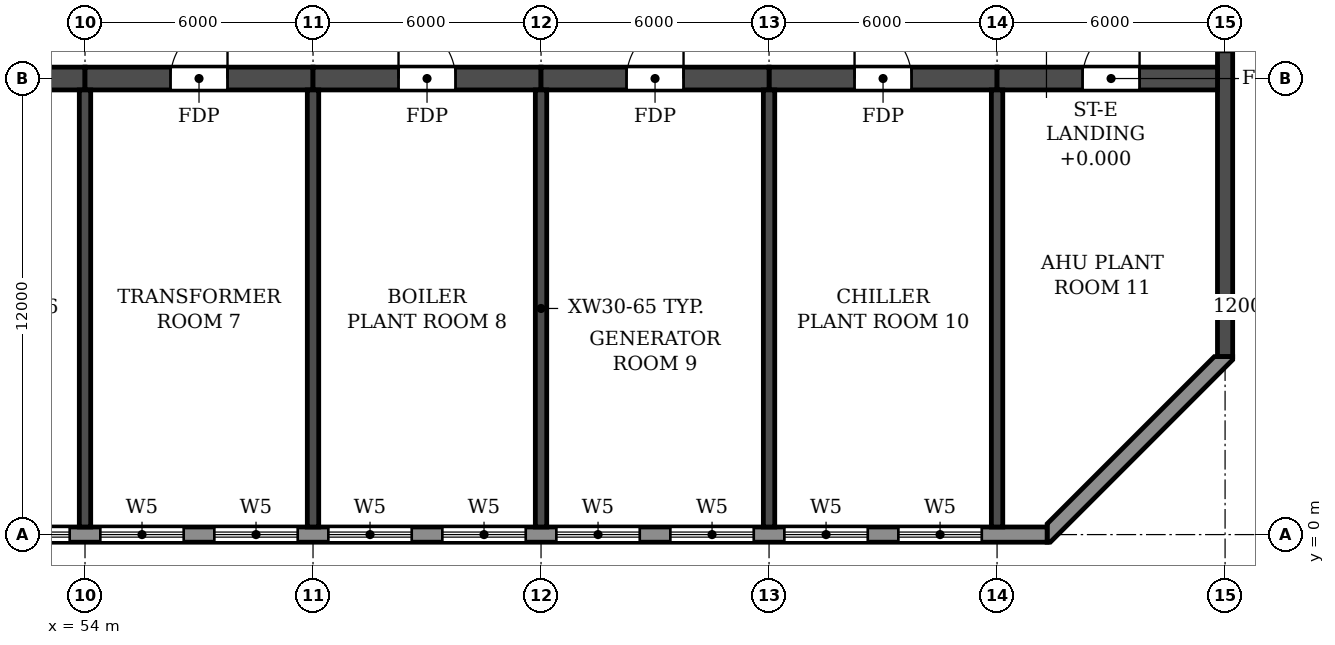
"""IFC4 building model, lengths in metres.
Left out: names, types, materials, properties, quantities, classifications, styles, units other than length and angle.
Written with IfcOpenShell. Run it as: python <this file> out.ifc"""

import sys

from ifc_helpers import new_model, si_unit, direction, frame, frame_2d, origin, place, context, subcontext, project, spatial, polyline, rectangle, outline, extrude, element, fill, save


model = new_model("IFC4")
c1 = context("Model", 3, precision=1e-05, world=origin(), true_north=direction((0.0, 1.0)))
c2 = subcontext(c1, "Body", "Model", "MODEL_VIEW")
j1 = project(units=[si_unit("LENGTHUNIT", "METRE"), si_unit("PLANEANGLEUNIT", "RADIAN")], contexts=[c1])
p1 = place(None, origin())
s1 = spatial("IfcSite", under=j1, at=p1, CompositionType="ELEMENT")
p2 = place(p1, origin())
s2 = spatial("IfcBuilding", under=s1, at=p2, CompositionType="ELEMENT")
p3 = place(p2, frame((0.0, 0.0, 165.3)))
s3 = spatial("IfcBuildingStorey", under=s2, at=p3, CompositionType="ELEMENT", Elevation=165.3)
for number, where, z_axis, x_axis in (
    (1, (54.0, 0.2, 0.0), (0.0, 0.0, 1.0), (0.0, 1.0, 0.0)),
    (2, (60.0, 0.2, 0.0), (0.0, 0.0, 1.0), (0.0, 1.0, 0.0)),
    (3, (66.0, 0.2, 0.0), (0.0, 0.0, 1.0), (0.0, 1.0, 0.0)),
    (4, (72.0, 0.2, 0.0), (0.0, 0.0, 1.0), (0.0, 1.0, 0.0)),
    (5, (78.0, 0.2, 0.0), (0.0, 0.0, 1.0), (0.0, 1.0, 0.0)),
):
    element("IfcWall", number, at=place(p3, frame(where, z_axis=z_axis, x_axis=x_axis)), inside=s3, PredefinedType="SHEAR", context=c2, shape_type="SweptSolid", body=[
        extrude(rectangle(XDim=11.5, YDim=0.3, at=frame_2d((5.75, 0.0))), origin(), (0.0, 0.0, 1.0), 6.38),
    ])
p4 = place(p3, frame((84.0, 4.683, 0.0), z_axis=(0.0, 0.0, 1.0), x_axis=(0.0, 1.0, 0.0)))
e6 = element("IfcWall", 6, at=p4, inside=s3, PredefinedType="SHEAR", context=c2, shape_type="SweptSolid", body=[
    extrude(rectangle(XDim=33.034, YDim=0.4, at=frame_2d((16.517, 0.0))), origin(), (0.0, 0.0, 1.0), 6.38),
])
p5 = place(p4, frame((23.817, 0.0, 0.9)))
e7 = element("IfcOpeningElement", 7, at=p5, cuts=e6, PredefinedType="OPENING", context=c2, shape_type="SweptSolid", body=[
    extrude(rectangle(XDim=1.2, YDim=1.5, at=frame_2d((0.6, 0.75))), frame((0.0, 0.21, 0.0), z_axis=(0.0, -1.0, 0.0), x_axis=(1.0, 0.0, 0.0)), (0.0, 0.0, 1.0), 0.42),
])
p6 = place(p4, frame((8.017, 0.0, 0.9)))
e8 = element("IfcOpeningElement", 8, at=p6, cuts=e6, PredefinedType="OPENING", context=c2, shape_type="SweptSolid", body=[
    extrude(rectangle(XDim=1.2, YDim=1.5, at=frame_2d((0.6, 0.75))), frame((0.0, 0.21, 0.0), z_axis=(0.0, -1.0, 0.0), x_axis=(1.0, 0.0, 0.0)), (0.0, 0.0, 1.0), 0.42),
])
p7 = place(p4, frame((15.917, 0.0, 0.9)))
e9 = element("IfcOpeningElement", 9, at=p7, cuts=e6, PredefinedType="OPENING", context=c2, shape_type="SweptSolid", body=[
    extrude(rectangle(XDim=1.2, YDim=1.5, at=frame_2d((0.6, 0.75))), frame((0.0, 0.21, 0.0), z_axis=(0.0, -1.0, 0.0), x_axis=(1.0, 0.0, 0.0)), (0.0, 0.0, 1.0), 0.42),
])
p8 = place(p3, frame((48.0, 12.0, 0.0), z_axis=(0.0, 0.0, 1.0), x_axis=(1.0, 0.0, 0.0)))
e10 = element("IfcWall", 10, at=p8, inside=s3, PredefinedType="SHEAR", context=c2, shape_type="SweptSolid", body=[
    extrude(rectangle(XDim=6.0, YDim=0.6, at=frame_2d((3.0, 0.0))), origin(), (0.0, 0.0, 1.0), 6.38),
])
p9 = place(p8, frame((2.25, 0.0, 0.0)))
e11 = element("IfcOpeningElement", 11, at=p9, cuts=e10, PredefinedType="OPENING", context=c2, shape_type="SweptSolid", body=[
    extrude(rectangle(XDim=1.5, YDim=2.1, at=frame_2d((0.75, 1.05))), frame((0.0, 0.31, 0.0), z_axis=(0.0, -1.0, 0.0), x_axis=(1.0, 0.0, 0.0)), (0.0, 0.0, 1.0), 0.62),
])
p10 = place(p3, frame((54.0, 12.0, 0.0), z_axis=(0.0, 0.0, 1.0), x_axis=(1.0, 0.0, 0.0)))
e12 = element("IfcWall", 12, at=p10, inside=s3, PredefinedType="SHEAR", context=c2, shape_type="SweptSolid", body=[
    extrude(rectangle(XDim=6.0, YDim=0.6, at=frame_2d((3.0, 0.0))), origin(), (0.0, 0.0, 1.0), 6.38),
])
p11 = place(p10, frame((2.25, 0.0, 0.0)))
e13 = element("IfcOpeningElement", 13, at=p11, cuts=e12, PredefinedType="OPENING", context=c2, shape_type="SweptSolid", body=[
    extrude(rectangle(XDim=1.5, YDim=2.1, at=frame_2d((0.75, 1.05))), frame((0.0, 0.31, 0.0), z_axis=(0.0, -1.0, 0.0), x_axis=(1.0, 0.0, 0.0)), (0.0, 0.0, 1.0), 0.62),
])
p12 = place(p3, frame((60.0, 12.0, 0.0), z_axis=(0.0, 0.0, 1.0), x_axis=(1.0, 0.0, 0.0)))
e14 = element("IfcWall", 14, at=p12, inside=s3, PredefinedType="SHEAR", context=c2, shape_type="SweptSolid", body=[
    extrude(rectangle(XDim=6.0, YDim=0.6, at=frame_2d((3.0, 0.0))), origin(), (0.0, 0.0, 1.0), 6.38),
])
p13 = place(p12, frame((2.25, 0.0, 0.0)))
e15 = element("IfcOpeningElement", 15, at=p13, cuts=e14, PredefinedType="OPENING", context=c2, shape_type="SweptSolid", body=[
    extrude(rectangle(XDim=1.5, YDim=2.1, at=frame_2d((0.75, 1.05))), frame((0.0, 0.31, 0.0), z_axis=(0.0, -1.0, 0.0), x_axis=(1.0, 0.0, 0.0)), (0.0, 0.0, 1.0), 0.62),
])
p14 = place(p3, frame((66.0, 12.0, 0.0), z_axis=(0.0, 0.0, 1.0), x_axis=(1.0, 0.0, 0.0)))
e16 = element("IfcWall", 16, at=p14, inside=s3, PredefinedType="SHEAR", context=c2, shape_type="SweptSolid", body=[
    extrude(rectangle(XDim=6.0, YDim=0.6, at=frame_2d((3.0, 0.0))), origin(), (0.0, 0.0, 1.0), 6.38),
])
p15 = place(p14, frame((2.25, 0.0, 0.0)))
e17 = element("IfcOpeningElement", 17, at=p15, cuts=e16, PredefinedType="OPENING", context=c2, shape_type="SweptSolid", body=[
    extrude(rectangle(XDim=1.5, YDim=2.1, at=frame_2d((0.75, 1.05))), frame((0.0, 0.31, 0.0), z_axis=(0.0, -1.0, 0.0), x_axis=(1.0, 0.0, 0.0)), (0.0, 0.0, 1.0), 0.62),
])
p16 = place(p3, frame((72.0, 12.0, 0.0), z_axis=(0.0, 0.0, 1.0), x_axis=(1.0, 0.0, 0.0)))
e18 = element("IfcWall", 18, at=p16, inside=s3, PredefinedType="SHEAR", context=c2, shape_type="SweptSolid", body=[
    extrude(rectangle(XDim=6.0, YDim=0.6, at=frame_2d((3.0, 0.0))), origin(), (0.0, 0.0, 1.0), 6.38),
])
p17 = place(p16, frame((2.25, 0.0, 0.0)))
e19 = element("IfcOpeningElement", 19, at=p17, cuts=e18, PredefinedType="OPENING", context=c2, shape_type="SweptSolid", body=[
    extrude(rectangle(XDim=1.5, YDim=2.1, at=frame_2d((0.75, 1.05))), frame((0.0, 0.31, 0.0), z_axis=(0.0, -1.0, 0.0), x_axis=(1.0, 0.0, 0.0)), (0.0, 0.0, 1.0), 0.62),
])
p18 = place(p3, frame((78.0, 12.0, 0.0), z_axis=(0.0, 0.0, 1.0), x_axis=(1.0, 0.0, 0.0)))
e20 = element("IfcWall", 20, at=p18, inside=s3, PredefinedType="SHEAR", context=c2, shape_type="SweptSolid", body=[
    extrude(rectangle(XDim=5.8, YDim=0.6, at=frame_2d((2.9, 0.0))), origin(), (0.0, 0.0, 1.0), 6.38),
])
p19 = place(p18, frame((2.25, 0.0, 0.0)))
e21 = element("IfcOpeningElement", 21, at=p19, cuts=e20, PredefinedType="OPENING", context=c2, shape_type="SweptSolid", body=[
    extrude(rectangle(XDim=1.5, YDim=2.1, at=frame_2d((0.75, 1.05))), frame((0.0, 0.31, 0.0), z_axis=(0.0, -1.0, 0.0), x_axis=(1.0, 0.0, 0.0)), (0.0, 0.0, 1.0), 0.62),
])
p20 = place(p3, frame((22.683, 0.0, 0.0), z_axis=(0.0, 0.0, 1.0), x_axis=(1.0, 0.0, 0.0)))
e22 = element("IfcWall", 22, at=p20, inside=s3, PredefinedType="STANDARD", context=c2, shape_type="SweptSolid", body=[
    extrude(rectangle(XDim=56.634, YDim=0.4, at=frame_2d((28.317, 0.0))), origin(), (0.0, 0.0, 1.0), 6.38),
])
p21 = place(p20, frame((1.717, 0.0, 0.6)))
e23 = element("IfcOpeningElement", 23, at=p21, cuts=e22, PredefinedType="OPENING", context=c2, shape_type="SweptSolid", body=[
    extrude(rectangle(XDim=2.2, YDim=2.4, at=frame_2d((1.1, 1.2))), frame((0.0, 0.21, 0.0), z_axis=(0.0, -1.0, 0.0), x_axis=(1.0, 0.0, 0.0)), (0.0, 0.0, 1.0), 0.42),
])
p22 = place(p20, frame((4.717, 0.0, 0.6)))
e24 = element("IfcOpeningElement", 24, at=p22, cuts=e22, PredefinedType="OPENING", context=c2, shape_type="SweptSolid", body=[
    extrude(rectangle(XDim=2.2, YDim=2.4, at=frame_2d((1.1, 1.2))), frame((0.0, 0.21, 0.0), z_axis=(0.0, -1.0, 0.0), x_axis=(1.0, 0.0, 0.0)), (0.0, 0.0, 1.0), 0.42),
])
p23 = place(p20, frame((7.717, 0.0, 0.6)))
e25 = element("IfcOpeningElement", 25, at=p23, cuts=e22, PredefinedType="OPENING", context=c2, shape_type="SweptSolid", body=[
    extrude(rectangle(XDim=2.2, YDim=2.4, at=frame_2d((1.1, 1.2))), frame((0.0, 0.21, 0.0), z_axis=(0.0, -1.0, 0.0), x_axis=(1.0, 0.0, 0.0)), (0.0, 0.0, 1.0), 0.42),
])
p24 = place(p20, frame((10.717, 0.0, 0.6)))
e26 = element("IfcOpeningElement", 26, at=p24, cuts=e22, PredefinedType="OPENING", context=c2, shape_type="SweptSolid", body=[
    extrude(rectangle(XDim=2.2, YDim=2.4, at=frame_2d((1.1, 1.2))), frame((0.0, 0.21, 0.0), z_axis=(0.0, -1.0, 0.0), x_axis=(1.0, 0.0, 0.0)), (0.0, 0.0, 1.0), 0.42),
])
p25 = place(p20, frame((13.717, 0.0, 0.6)))
e27 = element("IfcOpeningElement", 27, at=p25, cuts=e22, PredefinedType="OPENING", context=c2, shape_type="SweptSolid", body=[
    extrude(rectangle(XDim=2.2, YDim=2.4, at=frame_2d((1.1, 1.2))), frame((0.0, 0.21, 0.0), z_axis=(0.0, -1.0, 0.0), x_axis=(1.0, 0.0, 0.0)), (0.0, 0.0, 1.0), 0.42),
])
p26 = place(p20, frame((16.717, 0.0, 0.6)))
e28 = element("IfcOpeningElement", 28, at=p26, cuts=e22, PredefinedType="OPENING", context=c2, shape_type="SweptSolid", body=[
    extrude(rectangle(XDim=2.2, YDim=2.4, at=frame_2d((1.1, 1.2))), frame((0.0, 0.21, 0.0), z_axis=(0.0, -1.0, 0.0), x_axis=(1.0, 0.0, 0.0)), (0.0, 0.0, 1.0), 0.42),
])
p27 = place(p20, frame((19.717, 0.0, 0.6)))
e29 = element("IfcOpeningElement", 29, at=p27, cuts=e22, PredefinedType="OPENING", context=c2, shape_type="SweptSolid", body=[
    extrude(rectangle(XDim=2.2, YDim=2.4, at=frame_2d((1.1, 1.2))), frame((0.0, 0.21, 0.0), z_axis=(0.0, -1.0, 0.0), x_axis=(1.0, 0.0, 0.0)), (0.0, 0.0, 1.0), 0.42),
])
p28 = place(p20, frame((22.717, 0.0, 0.6)))
e30 = element("IfcOpeningElement", 30, at=p28, cuts=e22, PredefinedType="OPENING", context=c2, shape_type="SweptSolid", body=[
    extrude(rectangle(XDim=2.2, YDim=2.4, at=frame_2d((1.1, 1.2))), frame((0.0, 0.21, 0.0), z_axis=(0.0, -1.0, 0.0), x_axis=(1.0, 0.0, 0.0)), (0.0, 0.0, 1.0), 0.42),
])
p29 = place(p20, frame((25.717, 0.0, 0.6)))
e31 = element("IfcOpeningElement", 31, at=p29, cuts=e22, PredefinedType="OPENING", context=c2, shape_type="SweptSolid", body=[
    extrude(rectangle(XDim=2.2, YDim=2.4, at=frame_2d((1.1, 1.2))), frame((0.0, 0.21, 0.0), z_axis=(0.0, -1.0, 0.0), x_axis=(1.0, 0.0, 0.0)), (0.0, 0.0, 1.0), 0.42),
])
p30 = place(p20, frame((28.717, 0.0, 0.6)))
e32 = element("IfcOpeningElement", 32, at=p30, cuts=e22, PredefinedType="OPENING", context=c2, shape_type="SweptSolid", body=[
    extrude(rectangle(XDim=2.2, YDim=2.4, at=frame_2d((1.1, 1.2))), frame((0.0, 0.21, 0.0), z_axis=(0.0, -1.0, 0.0), x_axis=(1.0, 0.0, 0.0)), (0.0, 0.0, 1.0), 0.42),
])
p31 = place(p20, frame((31.717, 0.0, 0.6)))
e33 = element("IfcOpeningElement", 33, at=p31, cuts=e22, PredefinedType="OPENING", context=c2, shape_type="SweptSolid", body=[
    extrude(rectangle(XDim=2.2, YDim=2.4, at=frame_2d((1.1, 1.2))), frame((0.0, 0.21, 0.0), z_axis=(0.0, -1.0, 0.0), x_axis=(1.0, 0.0, 0.0)), (0.0, 0.0, 1.0), 0.42),
])
p32 = place(p20, frame((34.717, 0.0, 0.6)))
e34 = element("IfcOpeningElement", 34, at=p32, cuts=e22, PredefinedType="OPENING", context=c2, shape_type="SweptSolid", body=[
    extrude(rectangle(XDim=2.2, YDim=2.4, at=frame_2d((1.1, 1.2))), frame((0.0, 0.21, 0.0), z_axis=(0.0, -1.0, 0.0), x_axis=(1.0, 0.0, 0.0)), (0.0, 0.0, 1.0), 0.42),
])
p33 = place(p20, frame((37.717, 0.0, 0.6)))
e35 = element("IfcOpeningElement", 35, at=p33, cuts=e22, PredefinedType="OPENING", context=c2, shape_type="SweptSolid", body=[
    extrude(rectangle(XDim=2.2, YDim=2.4, at=frame_2d((1.1, 1.2))), frame((0.0, 0.21, 0.0), z_axis=(0.0, -1.0, 0.0), x_axis=(1.0, 0.0, 0.0)), (0.0, 0.0, 1.0), 0.42),
])
p34 = place(p20, frame((40.717, 0.0, 0.6)))
e36 = element("IfcOpeningElement", 36, at=p34, cuts=e22, PredefinedType="OPENING", context=c2, shape_type="SweptSolid", body=[
    extrude(rectangle(XDim=2.2, YDim=2.4, at=frame_2d((1.1, 1.2))), frame((0.0, 0.21, 0.0), z_axis=(0.0, -1.0, 0.0), x_axis=(1.0, 0.0, 0.0)), (0.0, 0.0, 1.0), 0.42),
])
p35 = place(p20, frame((43.717, 0.0, 0.6)))
e37 = element("IfcOpeningElement", 37, at=p35, cuts=e22, PredefinedType="OPENING", context=c2, shape_type="SweptSolid", body=[
    extrude(rectangle(XDim=2.2, YDim=2.4, at=frame_2d((1.1, 1.2))), frame((0.0, 0.21, 0.0), z_axis=(0.0, -1.0, 0.0), x_axis=(1.0, 0.0, 0.0)), (0.0, 0.0, 1.0), 0.42),
])
p36 = place(p20, frame((46.717, 0.0, 0.6)))
e38 = element("IfcOpeningElement", 38, at=p36, cuts=e22, PredefinedType="OPENING", context=c2, shape_type="SweptSolid", body=[
    extrude(rectangle(XDim=2.2, YDim=2.4, at=frame_2d((1.1, 1.2))), frame((0.0, 0.21, 0.0), z_axis=(0.0, -1.0, 0.0), x_axis=(1.0, 0.0, 0.0)), (0.0, 0.0, 1.0), 0.42),
])
p37 = place(p20, frame((49.717, 0.0, 0.6)))
e39 = element("IfcOpeningElement", 39, at=p37, cuts=e22, PredefinedType="OPENING", context=c2, shape_type="SweptSolid", body=[
    extrude(rectangle(XDim=2.2, YDim=2.4, at=frame_2d((1.1, 1.2))), frame((0.0, 0.21, 0.0), z_axis=(0.0, -1.0, 0.0), x_axis=(1.0, 0.0, 0.0)), (0.0, 0.0, 1.0), 0.42),
])
p38 = place(p20, frame((52.717, 0.0, 0.6)))
e40 = element("IfcOpeningElement", 40, at=p38, cuts=e22, PredefinedType="OPENING", context=c2, shape_type="SweptSolid", body=[
    extrude(rectangle(XDim=2.2, YDim=2.4, at=frame_2d((1.1, 1.2))), frame((0.0, 0.21, 0.0), z_axis=(0.0, -1.0, 0.0), x_axis=(1.0, 0.0, 0.0)), (0.0, 0.0, 1.0), 0.42),
])
p39 = place(p3, origin())
e41 = element("IfcWall", 41, at=p39, inside=s3, PredefinedType="STANDARD", context=c2, shape_type="SweptSolid", body=[
    extrude(outline(polyline([(79.317, -0.2), (79.4, -0.2), (84.2, 4.6), (84.2, 4.683), (83.717, 4.683), (79.317, 0.283), (79.317, -0.2)])), origin(), (0.0, 0.0, 1.0), 6.38),
])
p40 = place(p30, origin())
e42 = element("IfcWindow", 42, at=p40, inside=s3, PartitioningType="TRIPLE_PANEL_HORIZONTAL", PredefinedType="WINDOW", context=c2, shape_type="SweptSolid", body=[
    extrude(rectangle(XDim=2.2, YDim=2.4, at=frame_2d((1.1, 1.2))), frame((0.0, 0.03, 0.0), z_axis=(0.0, -1.0, 0.0), x_axis=(1.0, 0.0, 0.0)), (0.0, 0.0, 1.0), 0.06),
])
fill(e32, e42)
p41 = place(p31, origin())
e43 = element("IfcWindow", 43, at=p41, inside=s3, PartitioningType="TRIPLE_PANEL_HORIZONTAL", PredefinedType="WINDOW", context=c2, shape_type="SweptSolid", body=[
    extrude(rectangle(XDim=2.2, YDim=2.4, at=frame_2d((1.1, 1.2))), frame((0.0, 0.03, 0.0), z_axis=(0.0, -1.0, 0.0), x_axis=(1.0, 0.0, 0.0)), (0.0, 0.0, 1.0), 0.06),
])
fill(e33, e43)
p42 = place(p32, origin())
e44 = element("IfcWindow", 44, at=p42, inside=s3, PartitioningType="TRIPLE_PANEL_HORIZONTAL", PredefinedType="WINDOW", context=c2, shape_type="SweptSolid", body=[
    extrude(rectangle(XDim=2.2, YDim=2.4, at=frame_2d((1.1, 1.2))), frame((0.0, 0.03, 0.0), z_axis=(0.0, -1.0, 0.0), x_axis=(1.0, 0.0, 0.0)), (0.0, 0.0, 1.0), 0.06),
])
fill(e34, e44)
p43 = place(p33, origin())
e45 = element("IfcWindow", 45, at=p43, inside=s3, PartitioningType="TRIPLE_PANEL_HORIZONTAL", PredefinedType="WINDOW", context=c2, shape_type="SweptSolid", body=[
    extrude(rectangle(XDim=2.2, YDim=2.4, at=frame_2d((1.1, 1.2))), frame((0.0, 0.03, 0.0), z_axis=(0.0, -1.0, 0.0), x_axis=(1.0, 0.0, 0.0)), (0.0, 0.0, 1.0), 0.06),
])
fill(e35, e45)
p44 = place(p34, origin())
e46 = element("IfcWindow", 46, at=p44, inside=s3, PartitioningType="TRIPLE_PANEL_HORIZONTAL", PredefinedType="WINDOW", context=c2, shape_type="SweptSolid", body=[
    extrude(rectangle(XDim=2.2, YDim=2.4, at=frame_2d((1.1, 1.2))), frame((0.0, 0.03, 0.0), z_axis=(0.0, -1.0, 0.0), x_axis=(1.0, 0.0, 0.0)), (0.0, 0.0, 1.0), 0.06),
])
fill(e36, e46)
p45 = place(p35, origin())
e47 = element("IfcWindow", 47, at=p45, inside=s3, PartitioningType="TRIPLE_PANEL_HORIZONTAL", PredefinedType="WINDOW", context=c2, shape_type="SweptSolid", body=[
    extrude(rectangle(XDim=2.2, YDim=2.4, at=frame_2d((1.1, 1.2))), frame((0.0, 0.03, 0.0), z_axis=(0.0, -1.0, 0.0), x_axis=(1.0, 0.0, 0.0)), (0.0, 0.0, 1.0), 0.06),
])
fill(e37, e47)
p46 = place(p36, origin())
e48 = element("IfcWindow", 48, at=p46, inside=s3, PartitioningType="TRIPLE_PANEL_HORIZONTAL", PredefinedType="WINDOW", context=c2, shape_type="SweptSolid", body=[
    extrude(rectangle(XDim=2.2, YDim=2.4, at=frame_2d((1.1, 1.2))), frame((0.0, 0.03, 0.0), z_axis=(0.0, -1.0, 0.0), x_axis=(1.0, 0.0, 0.0)), (0.0, 0.0, 1.0), 0.06),
])
fill(e38, e48)
p47 = place(p37, origin())
e49 = element("IfcWindow", 49, at=p47, inside=s3, PartitioningType="TRIPLE_PANEL_HORIZONTAL", PredefinedType="WINDOW", context=c2, shape_type="SweptSolid", body=[
    extrude(rectangle(XDim=2.2, YDim=2.4, at=frame_2d((1.1, 1.2))), frame((0.0, 0.03, 0.0), z_axis=(0.0, -1.0, 0.0), x_axis=(1.0, 0.0, 0.0)), (0.0, 0.0, 1.0), 0.06),
])
fill(e39, e49)
p48 = place(p38, origin())
e50 = element("IfcWindow", 50, at=p48, inside=s3, PartitioningType="TRIPLE_PANEL_HORIZONTAL", PredefinedType="WINDOW", context=c2, shape_type="SweptSolid", body=[
    extrude(rectangle(XDim=2.2, YDim=2.4, at=frame_2d((1.1, 1.2))), frame((0.0, 0.03, 0.0), z_axis=(0.0, -1.0, 0.0), x_axis=(1.0, 0.0, 0.0)), (0.0, 0.0, 1.0), 0.06),
])
fill(e40, e50)
p49 = place(p11, origin())
e51 = element("IfcDoor", 51, at=p49, inside=s3, OperationType="DOUBLE_DOOR_SINGLE_SWING", PredefinedType="DOOR", context=c2, shape_type="SweptSolid", body=[
    extrude(rectangle(XDim=1.5, YDim=2.1, at=frame_2d((0.75, 1.05))), frame((0.0, 0.025, 0.0), z_axis=(0.0, -1.0, 0.0), x_axis=(1.0, 0.0, 0.0)), (0.0, 0.0, 1.0), 0.05),
])
fill(e13, e51)
p50 = place(p13, origin())
e52 = element("IfcDoor", 52, at=p50, inside=s3, OperationType="DOUBLE_DOOR_SINGLE_SWING", PredefinedType="DOOR", context=c2, shape_type="SweptSolid", body=[
    extrude(rectangle(XDim=1.5, YDim=2.1, at=frame_2d((0.75, 1.05))), frame((0.0, 0.025, 0.0), z_axis=(0.0, -1.0, 0.0), x_axis=(1.0, 0.0, 0.0)), (0.0, 0.0, 1.0), 0.05),
])
fill(e15, e52)
p51 = place(p15, origin())
e53 = element("IfcDoor", 53, at=p51, inside=s3, OperationType="DOUBLE_DOOR_SINGLE_SWING", PredefinedType="DOOR", context=c2, shape_type="SweptSolid", body=[
    extrude(rectangle(XDim=1.5, YDim=2.1, at=frame_2d((0.75, 1.05))), frame((0.0, 0.025, 0.0), z_axis=(0.0, -1.0, 0.0), x_axis=(1.0, 0.0, 0.0)), (0.0, 0.0, 1.0), 0.05),
])
fill(e17, e53)
p52 = place(p17, origin())
e54 = element("IfcDoor", 54, at=p52, inside=s3, OperationType="DOUBLE_DOOR_SINGLE_SWING", PredefinedType="DOOR", context=c2, shape_type="SweptSolid", body=[
    extrude(rectangle(XDim=1.5, YDim=2.1, at=frame_2d((0.75, 1.05))), frame((0.0, 0.025, 0.0), z_axis=(0.0, -1.0, 0.0), x_axis=(1.0, 0.0, 0.0)), (0.0, 0.0, 1.0), 0.05),
])
fill(e19, e54)
p53 = place(p19, origin())
e55 = element("IfcDoor", 55, at=p53, inside=s3, OperationType="DOUBLE_DOOR_SINGLE_SWING", PredefinedType="DOOR", context=c2, shape_type="SweptSolid", body=[
    extrude(rectangle(XDim=1.5, YDim=2.1, at=frame_2d((0.75, 1.05))), frame((0.0, 0.025, 0.0), z_axis=(0.0, -1.0, 0.0), x_axis=(1.0, 0.0, 0.0)), (0.0, 0.0, 1.0), 0.05),
])
fill(e21, e55)
save(model, sys.argv[1])
